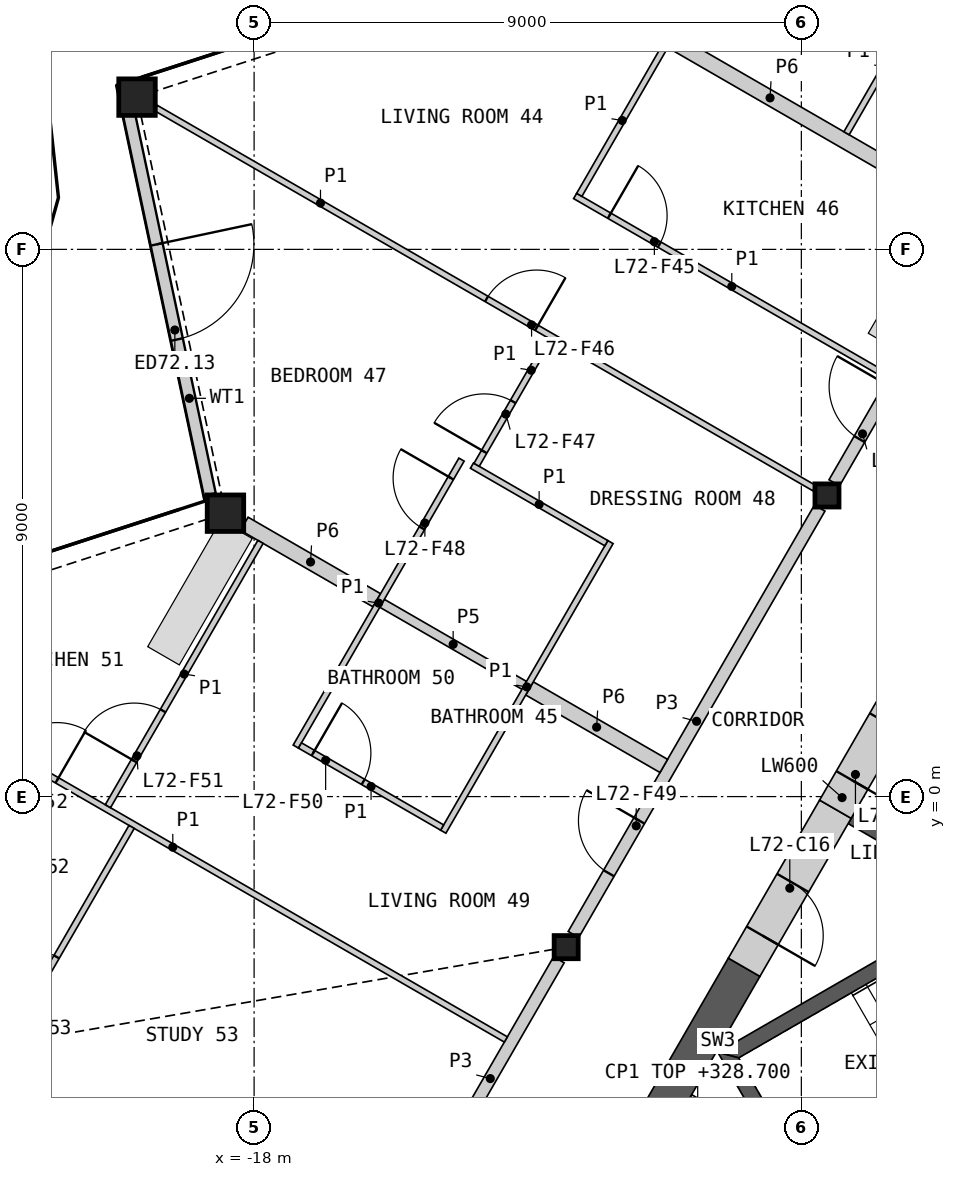
"""IFC4 building model, lengths in metres.
Left out: names, types, materials, properties, quantities, classifications, styles, units other than length and angle.
Written with IfcOpenShell. Run it as: python <this file> out.ifc"""

import sys

from ifc_helpers import new_model, si_unit, direction, frame, frame_2d, origin, origin_2d, place, context, subcontext, project, spatial, polyline, rectangle, hollow_rectangle, i_section, outline, extrude, element, fill, save


model = new_model("IFC4")
c1 = context("Model", 3, precision=1e-05, world=origin(), true_north=direction((0.0, 1.0)))
c2 = subcontext(c1, "Body", "Model", "MODEL_VIEW")
j1 = project(units=[si_unit("LENGTHUNIT", "METRE"), si_unit("PLANEANGLEUNIT", "RADIAN")], contexts=[c1])
p1 = place(None, origin())
s1 = spatial("IfcSite", under=j1, at=p1, CompositionType="ELEMENT")
p2 = place(p1, origin())
s2 = spatial("IfcBuilding", under=s1, at=p2, CompositionType="ELEMENT")
p3 = place(p2, frame((0.0, 0.0, 325.6)))
s3 = spatial("IfcBuildingStorey", under=s2, at=p3, CompositionType="ELEMENT", Elevation=325.6)
for number, where, z_axis, x_axis in (
    (1, (-19.926, 11.504, 0.0), (0.0, 0.0, 1.0), (1.0, 0.0, 0.0)),
    (2, (-18.471, 4.661, 0.0), (0.0, 0.0, 1.0), (1.0, 0.0, 0.0)),
):
    element("IfcColumn", number, at=place(p3, frame(where, z_axis=z_axis, x_axis=x_axis)), inside=s3, PredefinedType="COLUMN", context=c2, shape_type="SweptSolid", body=[
        extrude(hollow_rectangle(XDim=0.6, YDim=0.6, WallThickness=0.04, at=origin_2d()), origin(), (0.0, 0.0, 1.0), 3.4),
    ])
for number, where, z_axis, x_axis in (
    (3, (-8.578, 4.953, 0.0), (0.0, 0.0, 1.0), (1.0, 0.0, 0.0)),
    (4, (-12.868, -2.476, 0.0), (0.0, 0.0, 1.0), (1.0, 0.0, 0.0)),
):
    element("IfcColumn", number, at=place(p3, frame(where, z_axis=z_axis, x_axis=x_axis)), inside=s3, PredefinedType="COLUMN", context=c2, shape_type="SweptSolid", body=[
        extrude(i_section(OverallWidth=0.396, OverallDepth=0.381, WebThickness=0.019, FlangeThickness=0.03, at=origin_2d()), origin(), (0.0, 0.0, 1.0), 3.4),
    ])
p4 = place(p3, frame((-20.073, 11.294, 0.0), z_axis=(0.0, 0.0, 1.0), x_axis=(0.207893978909, -0.978151365349, 0.0)))
e5 = element("IfcWall", 5, at=p4, inside=s3, PredefinedType="SOLIDWALL", context=c2, shape_type="SweptSolid", body=[
    extrude(rectangle(XDim=6.466, YDim=0.2, at=frame_2d((3.233, 0.0))), origin(), (0.0, 0.0, 1.0), 2.488),
])
p5 = place(p4, frame((2.261, 0.0, 0.0)))
e6 = element("IfcOpeningElement", 6, at=p5, cuts=e5, PredefinedType="OPENING", context=c2, shape_type="SweptSolid", body=[
    extrude(rectangle(XDim=1.6, YDim=2.25, at=frame_2d((0.8, 1.125))), frame((0.0, 0.11, 0.0), z_axis=(0.0, -1.0, 0.0), x_axis=(1.0, 0.0, 0.0)), (0.0, 0.0, 1.0), 0.22),
])
p6 = place(p3, origin())
e7 = element("IfcWall", 7, at=p6, inside=s3, PredefinedType="SHEAR", context=c2, shape_type="SweptSolid", body=[
    extrude(outline(polyline([(-6.061, -1.697), (-8.231, -0.444), (-8.131, -0.271), (-5.96, -1.524), (-6.061, -1.697)])), origin(), (0.0, 0.0, 1.0), 3.1),
])
p7 = place(p3, origin())
e8 = element("IfcWall", 8, at=p7, inside=s3, PredefinedType="SHEAR", context=c2, shape_type="SweptSolid", body=[
    extrude(outline(polyline([(-5.307, -1.281), (-10.374, -4.206), (-10.032, -4.298), (-5.182, -1.498), (-5.307, -1.281)])), origin(), (0.0, 0.0, 1.0), 3.1),
])
p8 = place(p3, origin())
e9 = element("IfcWall", 9, at=p8, inside=s3, PredefinedType="SHEAR", context=c2, shape_type="SweptSolid", body=[
    extrude(outline(polyline([(-10.374, -4.206), (-8.83, -6.881), (-8.738, -6.539), (-10.032, -4.298), (-10.374, -4.206)])), origin(), (0.0, 0.0, 1.0), 3.1),
])
p9 = place(p3, origin())
e10 = element("IfcWall", 10, at=p9, inside=s3, PredefinedType="SHEAR", context=c2, shape_type="SweptSolid", body=[
    extrude(outline(polyline([(-8.738, -6.539), (-8.83, -6.881), (-3.763, -3.956), (-3.888, -3.739), (-8.738, -6.539)])), origin(), (0.0, 0.0, 1.0), 3.1),
])
p10 = place(p3, frame((-10.842, -4.967, 0.0), z_axis=(0.0, 0.0, 1.0), x_axis=(0.866098216386, -0.499873863663, 0.0)))
e11 = element("IfcWall", 11, at=p10, inside=s3, PredefinedType="PARTITIONING", context=c2, shape_type="SweptSolid", body=[
    extrude(rectangle(XDim=1.582, YDim=0.15, at=frame_2d((0.791, 0.0))), origin(), (0.0, 0.0, 1.0), 3.1),
])
p11 = place(p3, frame((-9.941, -2.807, 0.0), z_axis=(0.0, 0.0, 1.0), x_axis=(-0.500020646047, -0.866013483456, 0.0)))
e12 = element("IfcWall", 12, at=p11, inside=s3, PredefinedType="SHEAR", context=c2, shape_type="SweptSolid", body=[
    extrude(rectangle(XDim=4.559, YDim=0.6, at=frame_2d((2.28, 0.0))), origin(), (0.0, 0.0, 1.0), 3.1),
])
p12 = place(p3, frame((-8.44, -0.208, 0.0), z_axis=(0.0, 0.0, 1.0), x_axis=(-0.499997052475, -0.866027105532, 0.0)))
e13 = element("IfcWall", 13, at=p12, inside=s3, PredefinedType="SHEAR", context=c2, shape_type="SweptSolid", body=[
    extrude(rectangle(XDim=3.001, YDim=0.6, at=frame_2d((1.501, 0.0))), origin(), (0.0, 0.0, 1.0), 3.1),
])
p13 = place(p12, frame((1.4, 0.0, 0.0)))
e14 = element("IfcOpeningElement", 14, at=p13, cuts=e13, PredefinedType="OPENING", context=c2, shape_type="SweptSolid", body=[
    extrude(rectangle(XDim=1.0, YDim=2.1, at=frame_2d((0.5, 1.05))), frame((0.0, 0.31, 0.0), z_axis=(0.0, -1.0, 0.0), x_axis=(1.0, 0.0, 0.0)), (0.0, 0.0, 1.0), 0.62),
])
p14 = place(p3, frame((-7.34, 1.698, 0.0), z_axis=(0.0, 0.0, 1.0), x_axis=(-0.50002983664, -0.866008176907, 0.0)))
e15 = element("IfcWall", 15, at=p14, inside=s3, PredefinedType="SHEAR", context=c2, shape_type="SweptSolid", body=[
    extrude(rectangle(XDim=2.2, YDim=0.6, at=frame_2d((1.1, 0.0))), origin(), (0.0, 0.0, 1.0), 3.1),
])
p15 = place(p14, frame((0.55, 0.0, 0.0)))
e16 = element("IfcOpeningElement", 16, at=p15, cuts=e15, PredefinedType="OPENING", context=c2, shape_type="SweptSolid", body=[
    extrude(rectangle(XDim=1.1, YDim=2.1, at=frame_2d((0.55, 1.05))), frame((0.0, 0.31, 0.0), z_axis=(0.0, -1.0, 0.0), x_axis=(1.0, 0.0, 0.0)), (0.0, 0.0, 1.0), 0.62),
])
p16 = place(p3, frame((-8.458, 5.16, 0.0), z_axis=(0.0, 0.0, 1.0), x_axis=(0.499984266882, 0.866034487114, 0.0)))
e17 = element("IfcWall", 17, at=p16, inside=s3, PredefinedType="PARTITIONING", context=c2, shape_type="SweptSolid", body=[
    extrude(rectangle(XDim=8.099, YDim=0.2, at=frame_2d((4.049, 0.0))), origin(), (0.0, 0.0, 1.0), 3.1),
])
p17 = place(p16, frame((5.935, 0.0, 0.0)))
e18 = element("IfcOpeningElement", 18, at=p17, cuts=e17, PredefinedType="OPENING", context=c2, shape_type="SweptSolid", body=[
    extrude(rectangle(XDim=1.0, YDim=2.1, at=frame_2d((0.5, 1.05))), frame((0.0, 0.11, 0.0), z_axis=(0.0, -1.0, 0.0), x_axis=(1.0, 0.0, 0.0)), (0.0, 0.0, 1.0), 0.22),
])
p18 = place(p16, frame((0.83, 0.0, 0.0)))
e19 = element("IfcOpeningElement", 19, at=p18, cuts=e17, PredefinedType="OPENING", context=c2, shape_type="SweptSolid", body=[
    extrude(rectangle(XDim=1.0, YDim=2.1, at=frame_2d((0.5, 1.05))), frame((0.0, 0.11, 0.0), z_axis=(0.0, -1.0, 0.0), x_axis=(1.0, 0.0, 0.0)), (0.0, 0.0, 1.0), 0.22),
])
p19 = place(p3, frame((-12.748, -2.269, 0.0), z_axis=(0.0, 0.0, 1.0), x_axis=(0.499984266882, 0.866034487114, 0.0)))
e20 = element("IfcWall", 20, at=p19, inside=s3, PredefinedType="PARTITIONING", context=c2, shape_type="SweptSolid", body=[
    extrude(rectangle(XDim=8.099, YDim=0.2, at=frame_2d((4.049, 0.0))), origin(), (0.0, 0.0, 1.0), 3.1),
])
p20 = place(p19, frame((1.164, 0.0, 0.0)))
e21 = element("IfcOpeningElement", 21, at=p20, cuts=e20, PredefinedType="OPENING", context=c2, shape_type="SweptSolid", body=[
    extrude(rectangle(XDim=1.0, YDim=2.1, at=frame_2d((0.5, 1.05))), frame((0.0, 0.11, 0.0), z_axis=(0.0, -1.0, 0.0), x_axis=(1.0, 0.0, 0.0)), (0.0, 0.0, 1.0), 0.22),
])
p21 = place(p3, frame((-12.962, 13.482, 0.0), z_axis=(0.0, 0.0, 1.0), x_axis=(0.866022671543, -0.50000473235, 0.0)))
e22 = element("IfcWall", 22, at=p21, inside=s3, PredefinedType="PARTITIONING", context=c2, shape_type="SweptSolid", body=[
    extrude(rectangle(XDim=7.961, YDim=0.25, at=frame_2d((3.98, 0.0))), origin(), (0.0, 0.0, 1.0), 2.33),
])
p22 = place(p3, frame((-15.244, -6.592, 0.0), z_axis=(0.0, 0.0, 1.0), x_axis=(0.49999094734, 0.866030630277, 0.0)))
e23 = element("IfcWall", 23, at=p22, inside=s3, PredefinedType="PARTITIONING", context=c2, shape_type="SweptSolid", body=[
    extrude(rectangle(XDim=4.513, YDim=0.2, at=frame_2d((2.256, 0.0))), origin(), (0.0, 0.0, 1.0), 3.1),
])
p23 = place(p3, frame((-13.471, 1.779, 0.0), z_axis=(0.0, 0.0, 1.0), x_axis=(0.865989465428, -0.500062241894, 0.0)))
e24 = element("IfcWall", 24, at=p23, inside=s3, PredefinedType="PARTITIONING", context=c2, shape_type="SweptSolid", body=[
    extrude(rectangle(XDim=2.55, YDim=0.25, at=frame_2d((1.275, 0.0))), origin(), (0.0, 0.0, 1.0), 2.33),
])
p24 = place(p3, frame((-18.161, 4.487, 0.0), z_axis=(0.0, 0.0, 1.0), x_axis=(0.866012646713, -0.500022095245, 0.0)))
e25 = element("IfcWall", 25, at=p24, inside=s3, PredefinedType="PARTITIONING", context=c2, shape_type="SweptSolid", body=[
    extrude(rectangle(XDim=2.516, YDim=0.25, at=frame_2d((1.258, 0.0))), origin(), (0.0, 0.0, 1.0), 2.33),
])
p25 = place(p3, frame((-15.896, 3.179, 0.0), z_axis=(0.0, 0.0, 1.0), x_axis=(0.866059108428, -0.4999416173, 0.0)))
e26 = element("IfcWall", 26, at=p25, inside=s3, PredefinedType="PLUMBINGWALL", context=c2, shape_type="SweptSolid", body=[
    extrude(rectangle(XDim=2.7, YDim=0.15, at=frame_2d((1.35, 0.0))), origin(), (0.0, 0.0, 1.0), 2.33),
])
p26 = place(p3, frame((-24.815, 2.33, 0.0), z_axis=(0.0, 0.0, 1.0), x_axis=(0.866027776657, -0.499995890042, 0.0)))
e27 = element("IfcWall", 27, at=p26, inside=s3, PredefinedType="PARTITIONING", context=c2, shape_type="SweptSolid", body=[
    extrude(rectangle(XDim=12.649, YDim=0.1, at=frame_2d((6.325, 0.0))), origin(), (0.0, 0.0, 1.0), 2.33),
])
p27 = place(p26, frame((3.176, 0.0, 0.0)))
e28 = element("IfcOpeningElement", 28, at=p27, cuts=e27, PredefinedType="OPENING", context=c2, shape_type="SweptSolid", body=[
    extrude(rectangle(XDim=0.95, YDim=2.1, at=frame_2d((0.475, 1.05))), frame((0.0, 0.06, 0.0), z_axis=(0.0, -1.0, 0.0), x_axis=(1.0, 0.0, 0.0)), (0.0, 0.0, 1.0), 0.12),
])
p28 = place(p3, frame((-19.615, 11.325, 0.0), z_axis=(0.0, 0.0, 1.0), x_axis=(0.86602139559, -0.500006942333, 0.0)))
e29 = element("IfcWall", 29, at=p28, inside=s3, PredefinedType="PARTITIONING", context=c2, shape_type="SweptSolid", body=[
    extrude(rectangle(XDim=12.505, YDim=0.1, at=frame_2d((6.252, 0.0))), origin(), (0.0, 0.0, 1.0), 2.33),
])
p29 = place(p28, frame((6.28, 0.0, 0.0)))
e30 = element("IfcOpeningElement", 30, at=p29, cuts=e29, PredefinedType="OPENING", context=c2, shape_type="SweptSolid", body=[
    extrude(rectangle(XDim=0.95, YDim=2.1, at=frame_2d((0.475, 1.05))), frame((0.0, 0.06, 0.0), z_axis=(0.0, -1.0, 0.0), x_axis=(1.0, 0.0, 0.0)), (0.0, 0.0, 1.0), 0.12),
])
p30 = place(p3, frame((-23.361, -6.295, 0.0), z_axis=(0.0, 0.0, 1.0), x_axis=(0.499987686533, 0.866032512851, 0.0)))
e31 = element("IfcWall", 31, at=p30, inside=s3, PredefinedType="PARTITIONING", context=c2, shape_type="SweptSolid", body=[
    extrude(rectangle(XDim=6.693, YDim=0.1, at=frame_2d((3.347, 0.0))), origin(), (0.0, 0.0, 1.0), 2.33),
])
p31 = place(p30, frame((3.275, 0.0, 0.0)))
e32 = element("IfcOpeningElement", 32, at=p31, cuts=e31, PredefinedType="OPENING", context=c2, shape_type="SweptSolid", body=[
    extrude(rectangle(XDim=0.95, YDim=2.1, at=frame_2d((0.475, 1.05))), frame((0.0, 0.06, 0.0), z_axis=(0.0, -1.0, 0.0), x_axis=(1.0, 0.0, 0.0)), (0.0, 0.0, 1.0), 0.12),
])
p32 = place(p3, frame((-12.721, 9.878, 0.0), z_axis=(0.0, 0.0, 1.0), x_axis=(0.866027751316, -0.499995933934, 0.0)))
e33 = element("IfcWall", 33, at=p32, inside=s3, PredefinedType="PARTITIONING", context=c2, shape_type="SweptSolid", body=[
    extrude(rectangle(XDim=5.95, YDim=0.1, at=frame_2d((2.975, 0.0))), origin(), (0.0, 0.0, 1.0), 2.33),
])
p33 = place(p32, frame((0.65, 0.0, 0.0)))
e34 = element("IfcOpeningElement", 34, at=p33, cuts=e33, PredefinedType="OPENING", context=c2, shape_type="SweptSolid", body=[
    extrude(rectangle(XDim=0.95, YDim=2.1, at=frame_2d((0.475, 1.05))), frame((0.0, 0.06, 0.0), z_axis=(0.0, -1.0, 0.0), x_axis=(1.0, 0.0, 0.0)), (0.0, 0.0, 1.0), 0.12),
])
p34 = place(p3, frame((-17.314, 0.823, 0.0), z_axis=(0.0, 0.0, 1.0), x_axis=(0.499988730927, 0.866031909889, 0.0)))
e35 = element("IfcWall", 35, at=p34, inside=s3, PredefinedType="PARTITIONING", context=c2, shape_type="SweptSolid", body=[
    extrude(rectangle(XDim=5.45, YDim=0.1, at=frame_2d((2.725, 0.0))), origin(), (0.0, 0.0, 1.0), 2.33),
])
p35 = place(p34, frame((4.15, 0.0, 0.0)))
e36 = element("IfcOpeningElement", 36, at=p35, cuts=e35, PredefinedType="OPENING", context=c2, shape_type="SweptSolid", body=[
    extrude(rectangle(XDim=0.95, YDim=2.1, at=frame_2d((0.475, 1.05))), frame((0.0, 0.06, 0.0), z_axis=(0.0, -1.0, 0.0), x_axis=(1.0, 0.0, 0.0)), (0.0, 0.0, 1.0), 0.12),
])
p36 = place(p3, frame((-14.889, -0.577, 0.0), z_axis=(0.0, 0.0, 1.0), x_axis=(0.500015767406, 0.866016300277, 0.0)))
e37 = element("IfcWall", 37, at=p36, inside=s3, PredefinedType="PARTITIONING", context=c2, shape_type="SweptSolid", body=[
    extrude(rectangle(XDim=5.5, YDim=0.1, at=frame_2d((2.75, 0.0))), origin(), (0.0, 0.0, 1.0), 2.33),
])
p37 = place(p3, frame((-20.405, -0.158, 0.0), z_axis=(0.0, 0.0, 1.0), x_axis=(0.499989096993, 0.866031698547, 0.0)))
e38 = element("IfcWall", 38, at=p37, inside=s3, PredefinedType="PARTITIONING", context=c2, shape_type="SweptSolid", body=[
    extrude(rectangle(XDim=5.02, YDim=0.1, at=frame_2d((2.51, 0.0))), origin(), (0.0, 0.0, 1.0), 2.33),
])
p38 = place(p37, frame((0.862, 0.0, 0.0)))
e39 = element("IfcOpeningElement", 39, at=p38, cuts=e38, PredefinedType="OPENING", context=c2, shape_type="SweptSolid", body=[
    extrude(rectangle(XDim=0.95, YDim=2.1, at=frame_2d((0.475, 1.05))), frame((0.0, 0.06, 0.0), z_axis=(0.0, -1.0, 0.0), x_axis=(1.0, 0.0, 0.0)), (0.0, 0.0, 1.0), 0.12),
])
p39 = place(p3, frame((-12.652, 9.897, 0.0), z_axis=(0.0, 0.0, 1.0), x_axis=(0.500024172624, 0.866011447264, 0.0)))
e40 = element("IfcWall", 40, at=p39, inside=s3, PredefinedType="PARTITIONING", context=c2, shape_type="SweptSolid", body=[
    extrude(rectangle(XDim=2.825, YDim=0.1, at=frame_2d((1.413, 0.0))), origin(), (0.0, 0.0, 1.0), 2.33),
])
p40 = place(p3, frame((-17.246, 0.841, 0.0), z_axis=(0.0, 0.0, 1.0), x_axis=(0.86599734893, -0.500048589285, 0.0)))
e41 = element("IfcWall", 41, at=p40, inside=s3, PredefinedType="PARTITIONING", context=c2, shape_type="SweptSolid", body=[
    extrude(rectangle(XDim=2.7, YDim=0.1, at=frame_2d((1.35, 0.0))), origin(), (0.0, 0.0, 1.0), 2.33),
])
p41 = place(p40, frame((0.25, 0.0, 0.0)))
e42 = element("IfcOpeningElement", 42, at=p41, cuts=e41, PredefinedType="OPENING", context=c2, shape_type="SweptSolid", body=[
    extrude(rectangle(XDim=0.95, YDim=2.1, at=frame_2d((0.475, 1.05))), frame((0.0, 0.06, 0.0), z_axis=(0.0, -1.0, 0.0), x_axis=(1.0, 0.0, 0.0)), (0.0, 0.0, 1.0), 0.12),
])
p42 = place(p3, frame((-8.257, 10.91, 0.0), z_axis=(0.0, 0.0, 1.0), x_axis=(0.50001820224, 0.866014894461, 0.0)))
e43 = element("IfcWall", 43, at=p42, inside=s3, PredefinedType="PARTITIONING", context=c2, shape_type="SweptSolid", body=[
    extrude(rectangle(XDim=2.525, YDim=0.1, at=frame_2d((1.262, 0.0))), origin(), (0.0, 0.0, 1.0), 2.33),
])
p43 = place(p3, frame((-14.417, 5.443, 0.0), z_axis=(0.0, 0.0, 1.0), x_axis=(0.865991210529, -0.500059219779, 0.0)))
e44 = element("IfcWall", 44, at=p43, inside=s3, PredefinedType="PARTITIONING", context=c2, shape_type="SweptSolid", body=[
    extrude(rectangle(XDim=2.552, YDim=0.1, at=frame_2d((1.276, 0.0))), origin(), (0.0, 0.0, 1.0), 2.33),
])
p44 = place(p3, frame((-14.341, 5.457, 0.0), z_axis=(0.0, 0.0, 1.0), x_axis=(0.499954846121, 0.866051471819, 0.0)))
e45 = element("IfcWall", 45, at=p44, inside=s3, PredefinedType="PARTITIONING", context=c2, shape_type="SweptSolid", body=[
    extrude(rectangle(XDim=2.395, YDim=0.1, at=frame_2d((1.197, 0.0))), origin(), (0.0, 0.0, 1.0), 2.33),
])
p45 = place(p44, frame((0.25, 0.0, 0.0)))
e46 = element("IfcOpeningElement", 46, at=p45, cuts=e45, PredefinedType="OPENING", context=c2, shape_type="SweptSolid", body=[
    extrude(rectangle(XDim=0.95, YDim=2.1, at=frame_2d((0.475, 1.05))), frame((0.0, 0.06, 0.0), z_axis=(0.0, -1.0, 0.0), x_axis=(1.0, 0.0, 0.0)), (0.0, 0.0, 1.0), 0.12),
])
p46 = place(p5, origin())
e47 = element("IfcDoor", 47, at=p46, inside=s3, OperationType="DOUBLE_DOOR_SINGLE_SWING", PredefinedType="DOOR", context=c2, shape_type="SweptSolid", body=[
    extrude(rectangle(XDim=1.6, YDim=2.25, at=frame_2d((0.8, 1.125))), frame((0.0, 0.025, 0.0), z_axis=(0.0, -1.0, 0.0), x_axis=(1.0, 0.0, 0.0)), (0.0, 0.0, 1.0), 0.05),
])
fill(e6, e47)
p47 = place(p13, origin())
e48 = element("IfcDoor", 48, at=p47, inside=s3, OperationType="SINGLE_SWING_RIGHT", PredefinedType="DOOR", context=c2, shape_type="SweptSolid", body=[
    extrude(rectangle(XDim=1.0, YDim=2.1, at=frame_2d((0.5, 1.05))), frame((0.0, 0.055, 0.0), z_axis=(0.0, -1.0, 0.0), x_axis=(1.0, 0.0, 0.0)), (0.0, 0.0, 1.0), 0.05),
])
fill(e14, e48)
p48 = place(p15, origin())
e49 = element("IfcDoor", 49, at=p48, inside=s3, OperationType="SINGLE_SWING_RIGHT", PredefinedType="DOOR", context=c2, shape_type="SweptSolid", body=[
    extrude(rectangle(XDim=1.1, YDim=2.1, at=frame_2d((0.55, 1.05))), frame((0.0, 0.055, 0.0), z_axis=(0.0, -1.0, 0.0), x_axis=(1.0, 0.0, 0.0)), (0.0, 0.0, 1.0), 0.05),
])
fill(e16, e49)
p49 = place(p18, origin())
e50 = element("IfcDoor", 50, at=p49, inside=s3, OperationType="SINGLE_SWING_RIGHT", PredefinedType="DOOR", context=c2, shape_type="SweptSolid", body=[
    extrude(rectangle(XDim=1.0, YDim=2.1, at=frame_2d((0.5, 1.05))), frame((0.0, 0.025, 0.0), z_axis=(0.0, -1.0, 0.0), x_axis=(1.0, 0.0, 0.0)), (0.0, 0.0, 1.0), 0.05),
])
fill(e19, e50)
p50 = place(p33, origin())
e51 = element("IfcDoor", 51, at=p50, inside=s3, OperationType="SINGLE_SWING_LEFT", PredefinedType="DOOR", context=c2, shape_type="SweptSolid", body=[
    extrude(rectangle(XDim=0.95, YDim=2.1, at=frame_2d((0.475, 1.05))), frame((0.0, 0.025, 0.0), z_axis=(0.0, -1.0, 0.0), x_axis=(1.0, 0.0, 0.0)), (0.0, 0.0, 1.0), 0.05),
])
fill(e34, e51)
p51 = place(p29, origin())
e52 = element("IfcDoor", 52, at=p51, inside=s3, OperationType="SINGLE_SWING_RIGHT", PredefinedType="DOOR", context=c2, shape_type="SweptSolid", body=[
    extrude(rectangle(XDim=0.95, YDim=2.1, at=frame_2d((0.475, 1.05))), frame((0.0, 0.025, 0.0), z_axis=(0.0, -1.0, 0.0), x_axis=(1.0, 0.0, 0.0)), (0.0, 0.0, 1.0), 0.05),
])
fill(e30, e52)
p52 = place(p45, origin())
e53 = element("IfcDoor", 53, at=p52, inside=s3, OperationType="SINGLE_SWING_LEFT", PredefinedType="DOOR", context=c2, shape_type="SweptSolid", body=[
    extrude(rectangle(XDim=0.95, YDim=2.1, at=frame_2d((0.475, 1.05))), frame((0.0, 0.025, 0.0), z_axis=(0.0, -1.0, 0.0), x_axis=(1.0, 0.0, 0.0)), (0.0, 0.0, 1.0), 0.05),
])
fill(e46, e53)
p53 = place(p35, origin())
e54 = element("IfcDoor", 54, at=p53, inside=s3, OperationType="SINGLE_SWING_RIGHT", PredefinedType="DOOR", context=c2, shape_type="SweptSolid", body=[
    extrude(rectangle(XDim=0.95, YDim=2.1, at=frame_2d((0.475, 1.05))), frame((0.0, 0.025, 0.0), z_axis=(0.0, -1.0, 0.0), x_axis=(1.0, 0.0, 0.0)), (0.0, 0.0, 1.0), 0.05),
])
fill(e36, e54)
p54 = place(p20, origin())
e55 = element("IfcDoor", 55, at=p54, inside=s3, OperationType="SINGLE_SWING_RIGHT", PredefinedType="DOOR", context=c2, shape_type="SweptSolid", body=[
    extrude(rectangle(XDim=1.0, YDim=2.1, at=frame_2d((0.5, 1.05))), frame((0.0, 0.025, 0.0), z_axis=(0.0, -1.0, 0.0), x_axis=(1.0, 0.0, 0.0)), (0.0, 0.0, 1.0), 0.05),
])
fill(e21, e55)
p55 = place(p41, origin())
e56 = element("IfcDoor", 56, at=p55, inside=s3, OperationType="SINGLE_SWING_LEFT", PredefinedType="DOOR", context=c2, shape_type="SweptSolid", body=[
    extrude(rectangle(XDim=0.95, YDim=2.1, at=frame_2d((0.475, 1.05))), frame((0.0, 0.025, 0.0), z_axis=(0.0, -1.0, 0.0), x_axis=(1.0, 0.0, 0.0)), (0.0, 0.0, 1.0), 0.05),
])
fill(e42, e56)
p56 = place(p38, origin())
e57 = element("IfcDoor", 57, at=p56, inside=s3, OperationType="SINGLE_SWING_LEFT", PredefinedType="DOOR", context=c2, shape_type="SweptSolid", body=[
    extrude(rectangle(XDim=0.95, YDim=2.1, at=frame_2d((0.475, 1.05))), frame((0.0, 0.025, 0.0), z_axis=(0.0, -1.0, 0.0), x_axis=(1.0, 0.0, 0.0)), (0.0, 0.0, 1.0), 0.05),
])
fill(e39, e57)
p57 = place(p27, origin())
e58 = element("IfcDoor", 58, at=p57, inside=s3, OperationType="SINGLE_SWING_RIGHT", PredefinedType="DOOR", context=c2, shape_type="SweptSolid", body=[
    extrude(rectangle(XDim=0.95, YDim=2.1, at=frame_2d((0.475, 1.05))), frame((0.0, 0.025, 0.0), z_axis=(0.0, -1.0, 0.0), x_axis=(1.0, 0.0, 0.0)), (0.0, 0.0, 1.0), 0.05),
])
fill(e28, e58)
p58 = place(p31, origin())
e59 = element("IfcDoor", 59, at=p58, inside=s3, OperationType="SINGLE_SWING_LEFT", PredefinedType="DOOR", context=c2, shape_type="SweptSolid", body=[
    extrude(rectangle(XDim=0.95, YDim=2.1, at=frame_2d((0.475, 1.05))), frame((0.0, 0.025, 0.0), z_axis=(0.0, -1.0, 0.0), x_axis=(1.0, 0.0, 0.0)), (0.0, 0.0, 1.0), 0.05),
])
fill(e32, e59)
save(model, sys.argv[1])
